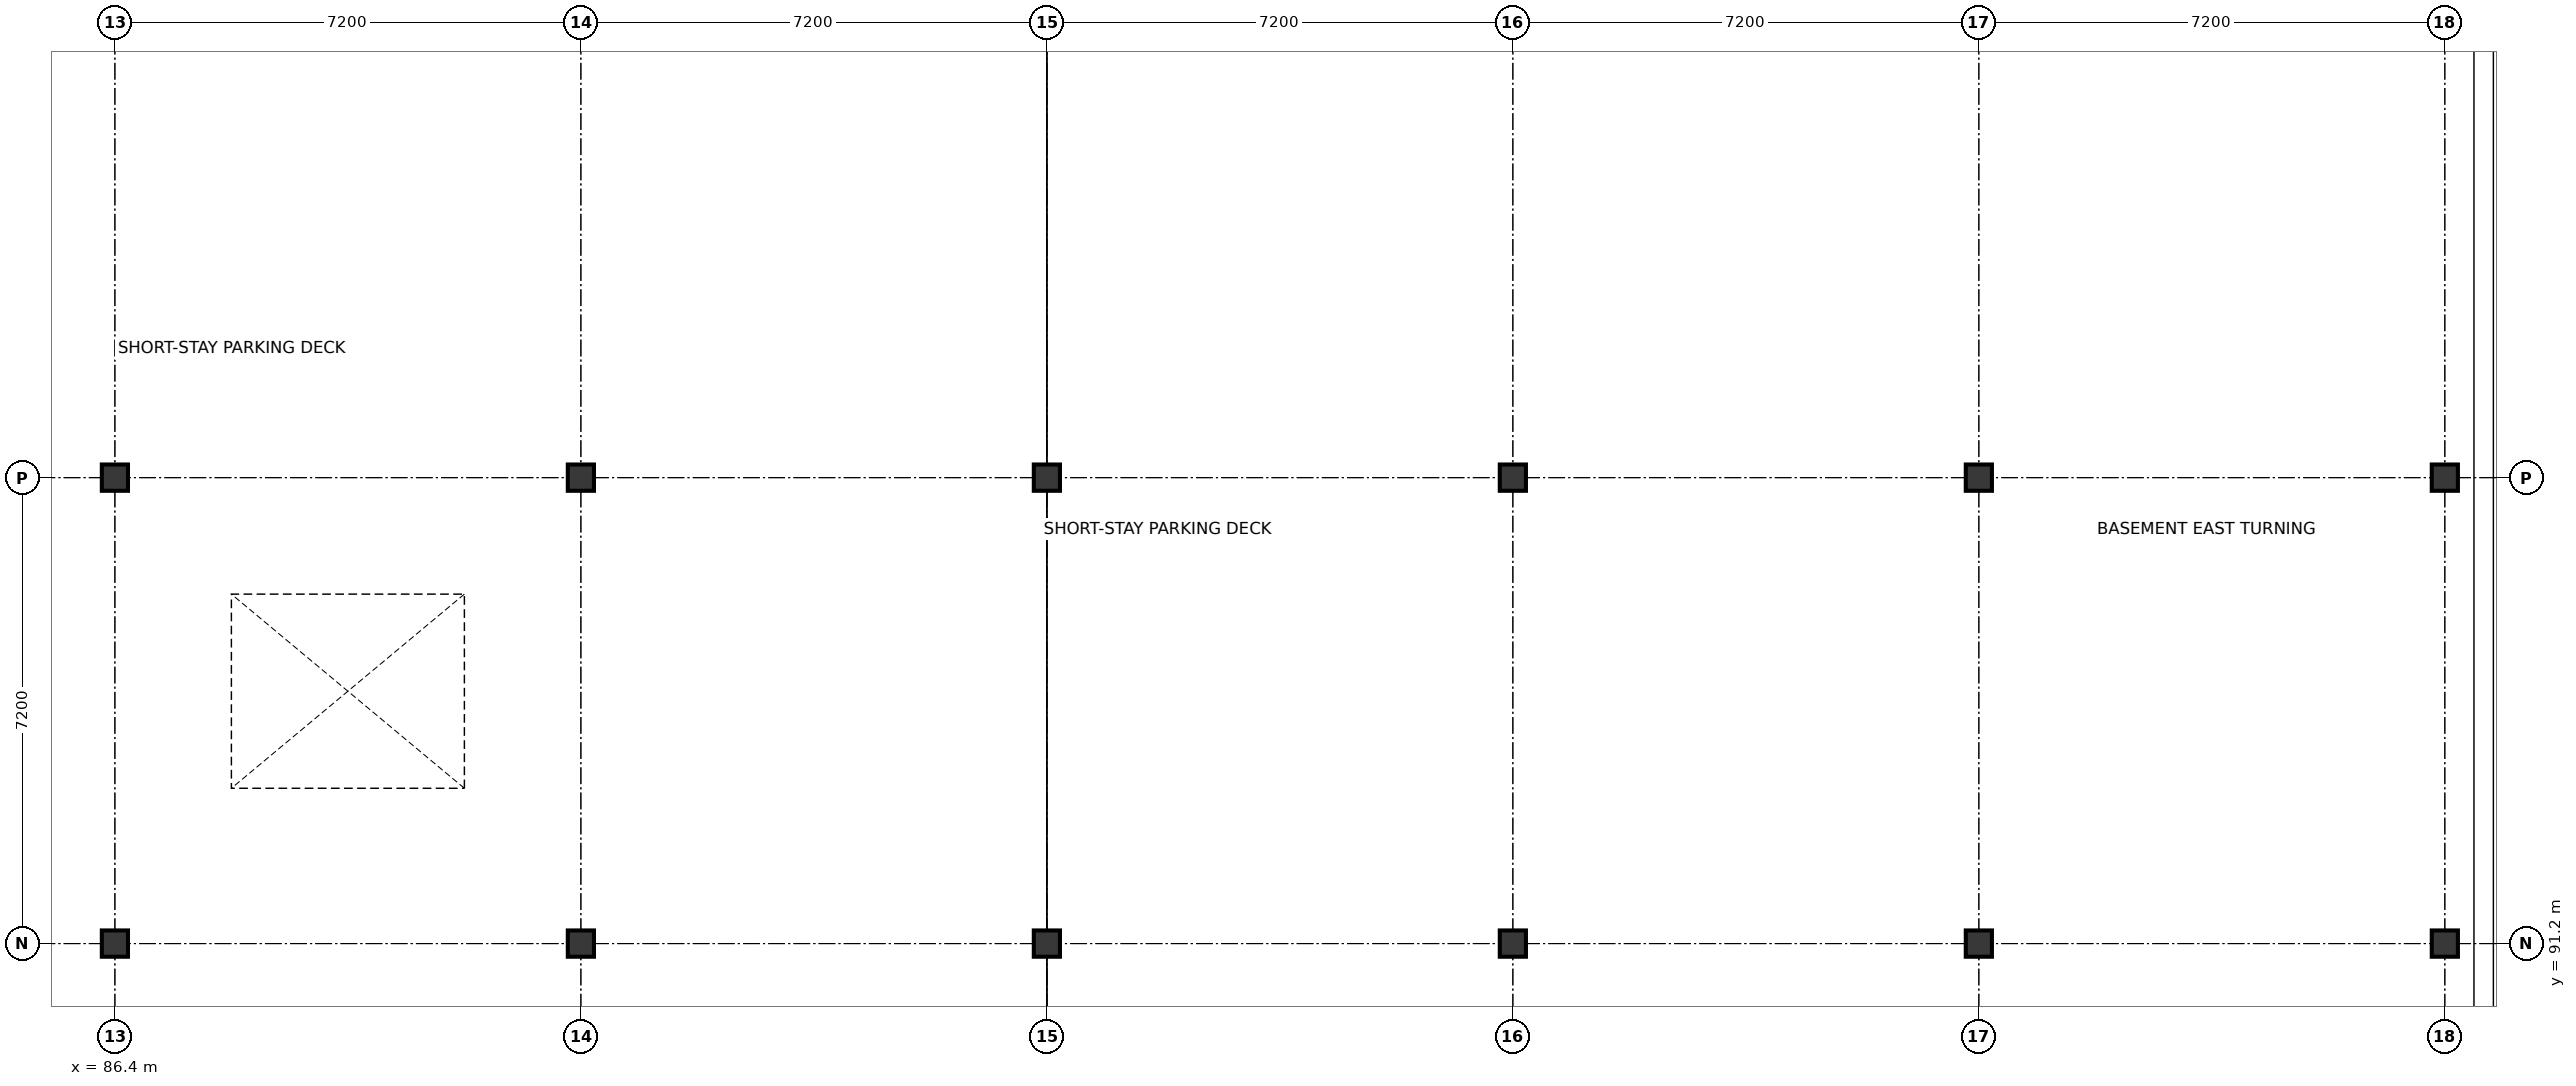
"""IFC4 building model, lengths in metres.
Left out: names, types, materials, properties, quantities, classifications, styles, units other than length and angle.
Written with IfcOpenShell. Run it as: python <this file> out.ifc"""

import sys

from ifc_helpers import new_model, si_unit, direction, frame, origin, origin_2d, place, context, subcontext, project, spatial, i_section, extrude, element, save


model = new_model("IFC4")
c1 = context("Model", 3, precision=1e-05, world=origin(), true_north=direction((0.0, 1.0)))
c2 = subcontext(c1, "Body", "Model", "MODEL_VIEW")
j1 = project(units=[si_unit("LENGTHUNIT", "METRE"), si_unit("PLANEANGLEUNIT", "RADIAN")], contexts=[c1])
p1 = place(None, origin())
s1 = spatial("IfcSite", under=j1, at=p1, CompositionType="ELEMENT")
p2 = place(p1, origin())
s2 = spatial("IfcBuilding", under=s1, at=p2, CompositionType="ELEMENT")
p3 = place(p2, frame((0.0, 0.0, -4.5)))
s3 = spatial("IfcBuildingStorey", under=s2, at=p3, CompositionType="ELEMENT", Elevation=-4.5)
for number, where, z_axis, x_axis in (
    (1, (86.4, 91.2, 0.0), (0.0, 0.0, 1.0), (1.0, 0.0, 0.0)),
    (2, (86.4, 98.4, 0.0), (0.0, 0.0, 1.0), (1.0, 0.0, 0.0)),
    (3, (93.6, 91.2, 0.0), (0.0, 0.0, 1.0), (1.0, 0.0, 0.0)),
    (4, (93.6, 98.4, 0.0), (0.0, 0.0, 1.0), (1.0, 0.0, 0.0)),
    (5, (100.8, 91.2, 0.0), (0.0, 0.0, 1.0), (1.0, 0.0, 0.0)),
    (6, (100.8, 98.4, 0.0), (0.0, 0.0, 1.0), (1.0, 0.0, 0.0)),
    (7, (108.0, 91.2, 0.0), (0.0, 0.0, 1.0), (1.0, 0.0, 0.0)),
    (8, (108.0, 98.4, 0.0), (0.0, 0.0, 1.0), (1.0, 0.0, 0.0)),
    (9, (115.2, 91.2, 0.0), (0.0, 0.0, 1.0), (1.0, 0.0, 0.0)),
    (10, (115.2, 98.4, 0.0), (0.0, 0.0, 1.0), (1.0, 0.0, 0.0)),
    (11, (122.4, 91.2, 0.0), (0.0, 0.0, 1.0), (1.0, 0.0, 0.0)),
    (12, (122.4, 98.4, 0.0), (0.0, 0.0, 1.0), (1.0, 0.0, 0.0)),
):
    element("IfcColumn", number, at=place(p3, frame(where, z_axis=z_axis, x_axis=x_axis)), inside=s3, PredefinedType="COLUMN", context=c2, shape_type="SweptSolid", body=[
        extrude(i_section(OverallWidth=0.404, OverallDepth=0.406, WebThickness=0.027, FlangeThickness=0.044, FilletRadius=0.015, at=origin_2d()), origin(), (0.0, 0.0, 1.0), 4.5),
    ])
save(model, sys.argv[1])
